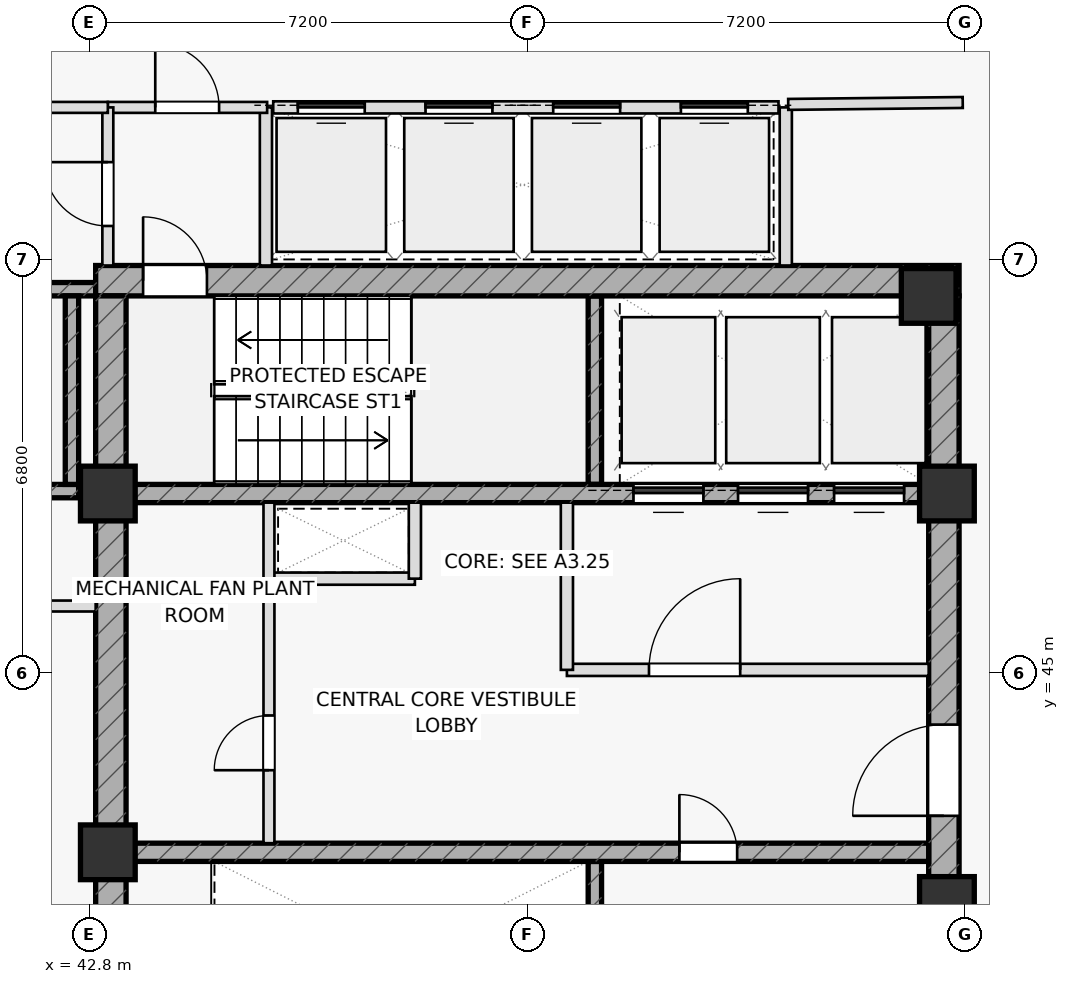
"""IFC4 building model, lengths in metres.
Left out: names, types, materials, properties, quantities, classifications, styles, units other than length and angle.
Written with IfcOpenShell. Run it as: python <this file> out.ifc"""

import sys

from ifc_helpers import new_model, si_unit, direction, frame, frame_2d, origin, origin_2d, place, context, subcontext, project, spatial, rectangle, extrude, element, fill, save


model = new_model("IFC4")
c1 = context("Model", 3, precision=1e-05, world=origin(), true_north=direction((0.0, 1.0)))
c2 = subcontext(c1, "Body", "Model", "MODEL_VIEW")
j1 = project(units=[si_unit("LENGTHUNIT", "METRE"), si_unit("PLANEANGLEUNIT", "RADIAN")], contexts=[c1])
p1 = place(None, origin())
s1 = spatial("IfcSite", under=j1, at=p1, CompositionType="ELEMENT")
p2 = place(p1, origin())
s2 = spatial("IfcBuilding", under=s1, at=p2, CompositionType="ELEMENT")
p3 = place(p2, frame((0.0, 0.0, 325.5)))
s3 = spatial("IfcBuildingStorey", under=s2, at=p3, CompositionType="ELEMENT", Elevation=325.5)
for number, where, z_axis, x_axis in (
    (1, (51.11, 48.1, 0.0), (0.0, 0.0, 1.0), (0.0, 1.0, 0.0)),
    (2, (51.11, 38.8, 0.0), (0.0, 0.0, 1.0), (0.0, 1.0, 0.0)),
):
    element("IfcWall", number, at=place(p3, frame(where, z_axis=z_axis, x_axis=x_axis)), inside=s3, PredefinedType="SHEAR", context=c2, shape_type="SweptSolid", body=[
        extrude(rectangle(XDim=3.1, YDim=0.22, at=frame_2d((1.55, 0.0))), origin(), (0.0, 0.0, 1.0), 6.25),
    ])
p4 = place(p3, frame((34.93, 47.99, 0.0), z_axis=(0.0, 0.0, 1.0), x_axis=(1.0, 0.0, 0.0)))
e3 = element("IfcWall", 3, at=p4, inside=s3, PredefinedType="SHEAR", context=c2, shape_type="SweptSolid", body=[
    extrude(rectangle(XDim=7.69, YDim=0.22, at=frame_2d((3.845, 0.0))), origin(), (0.0, 0.0, 1.0), 6.25),
])
p5 = place(p4, frame((0.55, 0.0, 0.0)))
e4 = element("IfcOpeningElement", 4, at=p5, cuts=e3, PredefinedType="OPENING", context=c2, shape_type="SweptSolid", body=[
    extrude(rectangle(XDim=1.05, YDim=2.2, at=frame_2d((0.525, 1.1))), frame((0.0, 0.12, 0.0), z_axis=(0.0, -1.0, 0.0), x_axis=(1.0, 0.0, 0.0)), (0.0, 0.0, 1.0), 0.24),
])
p6 = place(p3, frame((34.93, 51.31, 0.0), z_axis=(0.0, 0.0, 1.0), x_axis=(1.0, 0.0, 0.0)))
e5 = element("IfcWall", 5, at=p6, inside=s3, PredefinedType="SHEAR", context=c2, shape_type="SweptSolid", body=[
    extrude(rectangle(XDim=8.12, YDim=0.22, at=frame_2d((4.06, 0.0))), origin(), (0.0, 0.0, 1.0), 6.25),
])
p7 = place(p3, frame((42.51, 48.1, 0.0), z_axis=(0.0, 0.0, 1.0), x_axis=(0.0, 1.0, 0.0)))
e6 = element("IfcWall", 6, at=p7, inside=s3, PredefinedType="SHEAR", context=c2, shape_type="SweptSolid", body=[
    extrude(rectangle(XDim=3.1, YDim=0.22, at=frame_2d((1.55, 0.0))), origin(), (0.0, 0.0, 1.0), 6.25),
])
p8 = place(p3, frame((42.9, 51.45, 0.0), z_axis=(0.0, 0.0, 1.0), x_axis=(1.0, 0.0, 0.0)))
e7 = element("IfcWall", 7, at=p8, inside=s3, PredefinedType="SHEAR", context=c2, shape_type="SweptSolid", body=[
    extrude(rectangle(XDim=14.2, YDim=0.5, at=frame_2d((7.1, 0.0))), origin(), (0.0, 0.0, 1.0), 6.25),
])
p9 = place(p8, frame((0.78, 0.0, 0.0)))
e8 = element("IfcOpeningElement", 8, at=p9, cuts=e7, PredefinedType="OPENING", context=c2, shape_type="SweptSolid", body=[
    extrude(rectangle(XDim=1.05, YDim=2.2, at=frame_2d((0.525, 1.1))), frame((0.0, 0.26, 0.0), z_axis=(0.0, -1.0, 0.0), x_axis=(1.0, 0.0, 0.0)), (0.0, 0.0, 1.0), 0.52),
])
p10 = place(p3, frame((43.15, 38.8, 0.0), z_axis=(0.0, 0.0, 1.0), x_axis=(0.0, 1.0, 0.0)))
e9 = element("IfcWall", 9, at=p10, inside=s3, PredefinedType="SHEAR", context=c2, shape_type="SweptSolid", body=[
    extrude(rectangle(XDim=12.4, YDim=0.5, at=frame_2d((6.2, 0.0))), origin(), (0.0, 0.0, 1.0), 6.25),
])
p11 = place(p3, frame((56.85, 38.8, 0.0), z_axis=(0.0, 0.0, 1.0), x_axis=(0.0, 1.0, 0.0)))
e10 = element("IfcWall", 10, at=p11, inside=s3, PredefinedType="SHEAR", context=c2, shape_type="SweptSolid", body=[
    extrude(rectangle(XDim=12.4, YDim=0.5, at=frame_2d((6.2, 0.0))), origin(), (0.0, 0.0, 1.0), 6.25),
])
p12 = place(p11, frame((3.85, 0.0, 0.0)))
e11 = element("IfcOpeningElement", 11, at=p12, cuts=e10, PredefinedType="OPENING", context=c2, shape_type="SweptSolid", body=[
    extrude(rectangle(XDim=1.5, YDim=2.2, at=frame_2d((0.75, 1.1))), frame((0.0, 0.26, 0.0), z_axis=(0.0, -1.0, 0.0), x_axis=(1.0, 0.0, 0.0)), (0.0, 0.0, 1.0), 0.52),
])
p13 = place(p3, frame((43.4, 47.95, 0.0), z_axis=(0.0, 0.0, 1.0), x_axis=(1.0, 0.0, 0.0)))
e12 = element("IfcWall", 12, at=p13, inside=s3, PredefinedType="SHEAR", context=c2, shape_type="SweptSolid", body=[
    extrude(rectangle(XDim=13.2, YDim=0.3, at=frame_2d((6.6, 0.0))), origin(), (0.0, 0.0, 1.0), 6.25),
])
p14 = place(p13, frame((8.345, 0.0, 0.0)))
e13 = element("IfcOpeningElement", 13, at=p14, cuts=e12, PredefinedType="OPENING", context=c2, shape_type="SweptSolid", body=[
    extrude(rectangle(XDim=1.15, YDim=2.2, at=frame_2d((0.575, 1.1))), frame((0.0, 0.16, 0.0), z_axis=(0.0, -1.0, 0.0), x_axis=(1.0, 0.0, 0.0)), (0.0, 0.0, 1.0), 0.32),
])
p15 = place(p13, frame((10.065, 0.0, 0.0)))
e14 = element("IfcOpeningElement", 14, at=p15, cuts=e12, PredefinedType="OPENING", context=c2, shape_type="SweptSolid", body=[
    extrude(rectangle(XDim=1.15, YDim=2.2, at=frame_2d((0.575, 1.1))), frame((0.0, 0.16, 0.0), z_axis=(0.0, -1.0, 0.0), x_axis=(1.0, 0.0, 0.0)), (0.0, 0.0, 1.0), 0.32),
])
p16 = place(p13, frame((11.645, 0.0, 0.0)))
e15 = element("IfcOpeningElement", 15, at=p16, cuts=e12, PredefinedType="OPENING", context=c2, shape_type="SweptSolid", body=[
    extrude(rectangle(XDim=1.15, YDim=2.2, at=frame_2d((0.575, 1.1))), frame((0.0, 0.16, 0.0), z_axis=(0.0, -1.0, 0.0), x_axis=(1.0, 0.0, 0.0)), (0.0, 0.0, 1.0), 0.32),
])
p17 = place(p3, frame((43.4, 42.05, 0.0), z_axis=(0.0, 0.0, 1.0), x_axis=(1.0, 0.0, 0.0)))
e16 = element("IfcWall", 16, at=p17, inside=s3, PredefinedType="SHEAR", context=c2, shape_type="SweptSolid", body=[
    extrude(rectangle(XDim=13.2, YDim=0.3, at=frame_2d((6.6, 0.0))), origin(), (0.0, 0.0, 1.0), 6.25),
])
p18 = place(p17, frame((9.1, 0.0, 0.0)))
e17 = element("IfcOpeningElement", 17, at=p18, cuts=e16, PredefinedType="OPENING", context=c2, shape_type="SweptSolid", body=[
    extrude(rectangle(XDim=0.95, YDim=2.05, at=frame_2d((0.475, 1.025))), frame((0.0, 0.16, 0.0), z_axis=(0.0, -1.0, 0.0), x_axis=(1.0, 0.0, 0.0)), (0.0, 0.0, 1.0), 0.32),
])
for number, where, z_axis, x_axis in (
    (18, (43.1, 47.95, 0.0), (0.0, 0.0, 1.0), (1.0, 0.0, 0.0)),
    (19, (56.9, 47.95, 0.0), (0.0, 0.0, 1.0), (1.0, 0.0, 0.0)),
    (20, (56.6, 51.2, 0.0), (0.0, 0.0, 1.0), (1.0, 0.0, 0.0)),
    (21, (43.1, 42.05, 0.0), (0.0, 0.0, 1.0), (1.0, 0.0, 0.0)),
    (22, (56.9, 41.2, 0.0), (0.0, 0.0, 1.0), (1.0, 0.0, 0.0)),
):
    element("IfcColumn", number, at=place(p3, frame(where, z_axis=z_axis, x_axis=x_axis)), inside=s3, PredefinedType="COLUMN", context=c2, shape_type="SweptSolid", body=[
        extrude(rectangle(XDim=0.9, YDim=0.9, at=origin_2d()), origin(), (0.0, 0.0, 1.0), 6.25),
    ])
for number, where, z_axis, x_axis in (
    (23, (45.7, 51.7, 0.0), (0.0, 0.0, 1.0), (0.0, 1.0, 0.0)),
    (24, (54.25, 51.7, 0.0), (0.0, 0.0, 1.0), (0.0, 1.0, 0.0)),
):
    element("IfcWall", number, at=place(p3, frame(where, z_axis=z_axis, x_axis=x_axis)), inside=s3, PredefinedType="PARTITIONING", context=c2, shape_type="SweptSolid", body=[
        extrude(rectangle(XDim=2.6, YDim=0.2, at=frame_2d((1.3, 0.0))), origin(), (0.0, 0.0, 1.0), 6.25),
    ])
p19 = place(p3, frame((45.75, 46.55, 0.0), z_axis=(0.0, 0.0, 1.0), x_axis=(1.0, 0.0, 0.0)))
e25 = element("IfcWall", 25, at=p19, inside=s3, PredefinedType="PARTITIONING", context=c2, shape_type="SweptSolid", body=[
    extrude(rectangle(XDim=2.4, YDim=0.2, at=frame_2d((1.2, 0.0))), origin(), (0.0, 0.0, 1.0), 6.25),
])
p20 = place(p3, frame((48.15, 46.55, 0.0), z_axis=(0.0, 0.0, 1.0), x_axis=(0.0, 1.0, 0.0)))
e26 = element("IfcWall", 26, at=p20, inside=s3, PredefinedType="PARTITIONING", context=c2, shape_type="SweptSolid", body=[
    extrude(rectangle(XDim=1.25, YDim=0.2, at=frame_2d((0.625, 0.0))), origin(), (0.0, 0.0, 1.0), 6.25),
])
p21 = place(p3, frame((50.65, 45.05, 0.0), z_axis=(0.0, 0.0, 1.0), x_axis=(1.0, 0.0, 0.0)))
e27 = element("IfcWall", 27, at=p21, inside=s3, PredefinedType="PARTITIONING", context=c2, shape_type="SweptSolid", body=[
    extrude(rectangle(XDim=5.95, YDim=0.2, at=frame_2d((2.975, 0.0))), origin(), (0.0, 0.0, 1.0), 6.25),
])
p22 = place(p21, frame((1.35, 0.0, 0.0)))
e28 = element("IfcOpeningElement", 28, at=p22, cuts=e27, PredefinedType="OPENING", context=c2, shape_type="SweptSolid", body=[
    extrude(rectangle(XDim=1.5, YDim=2.2, at=frame_2d((0.75, 1.1))), frame((0.0, 0.11, 0.0), z_axis=(0.0, -1.0, 0.0), x_axis=(1.0, 0.0, 0.0)), (0.0, 0.0, 1.0), 0.22),
])
p23 = place(p3, frame((50.65, 45.05, 0.0), z_axis=(0.0, 0.0, 1.0), x_axis=(0.0, 1.0, 0.0)))
e29 = element("IfcWall", 29, at=p23, inside=s3, PredefinedType="PARTITIONING", context=c2, shape_type="SweptSolid", body=[
    extrude(rectangle(XDim=2.75, YDim=0.2, at=frame_2d((1.375, 0.0))), origin(), (0.0, 0.0, 1.0), 6.25),
])
p24 = place(p3, frame((45.75, 42.2, 0.0), z_axis=(0.0, 0.0, 1.0), x_axis=(0.0, 1.0, 0.0)))
e30 = element("IfcWall", 30, at=p24, inside=s3, PredefinedType="PARTITIONING", context=c2, shape_type="SweptSolid", body=[
    extrude(rectangle(XDim=5.6, YDim=0.18, at=frame_2d((2.8, 0.0))), origin(), (0.0, 0.0, 1.0), 6.25),
])
p25 = place(p24, frame((1.2, 0.0, 0.0)))
e31 = element("IfcOpeningElement", 31, at=p25, cuts=e30, PredefinedType="OPENING", context=c2, shape_type="SweptSolid", body=[
    extrude(rectangle(XDim=0.9, YDim=2.05, at=frame_2d((0.45, 1.025))), frame((0.0, 0.1, 0.0), z_axis=(0.0, -1.0, 0.0), x_axis=(1.0, 0.0, 0.0)), (0.0, 0.0, 1.0), 0.2),
])
p26 = place(p3, frame((43.1, 54.3, 0.0), z_axis=(0.0, 0.0, 1.0), x_axis=(1.0, 0.0, 0.0)))
e32 = element("IfcWall", 32, at=p26, inside=s3, PredefinedType="PARTITIONING", context=c2, shape_type="SweptSolid", body=[
    extrude(rectangle(XDim=2.62, YDim=0.18, at=frame_2d((1.31, 0.0))), origin(), (0.0, 0.0, 1.0), 4.625),
])
p27 = place(p26, frame((0.78, 0.0, 0.0)))
e33 = element("IfcOpeningElement", 33, at=p27, cuts=e32, PredefinedType="OPENING", context=c2, shape_type="SweptSolid", body=[
    extrude(rectangle(XDim=1.05, YDim=2.2, at=frame_2d((0.525, 1.1))), frame((0.0, 0.1, 0.0), z_axis=(0.0, -1.0, 0.0), x_axis=(1.0, 0.0, 0.0)), (0.0, 0.0, 1.0), 0.2),
])
p28 = place(p3, frame((43.1, 51.7, 0.0), z_axis=(0.0, 0.0, 1.0), x_axis=(0.0, 1.0, 0.0)))
e34 = element("IfcWall", 34, at=p28, inside=s3, PredefinedType="PARTITIONING", context=c2, shape_type="SweptSolid", body=[
    extrude(rectangle(XDim=2.6, YDim=0.18, at=frame_2d((1.3, 0.0))), origin(), (0.0, 0.0, 1.0), 4.625),
])
p29 = place(p28, frame((0.65, 0.0, 0.0)))
e35 = element("IfcOpeningElement", 35, at=p29, cuts=e34, PredefinedType="OPENING", context=c2, shape_type="SweptSolid", body=[
    extrude(rectangle(XDim=1.05, YDim=2.2, at=frame_2d((0.525, 1.1))), frame((0.0, 0.1, 0.0), z_axis=(0.0, -1.0, 0.0), x_axis=(1.0, 0.0, 0.0)), (0.0, 0.0, 1.0), 0.2),
])
p30 = place(p3, frame((34.629, 54.3, 0.0), z_axis=(0.0, 0.0, 1.0), x_axis=(1.0, 0.0, 0.0)))
e36 = element("IfcWall", 36, at=p30, inside=s3, PredefinedType="PARTITIONING", context=c2, shape_type="SweptSolid", body=[
    extrude(rectangle(XDim=8.471, YDim=0.18, at=frame_2d((4.236, 0.0))), origin(), (0.0, 0.0, 1.0), 3.725),
])
p31 = place(p3, frame((34.85, 46.1, 0.0), z_axis=(0.0, 0.0, 1.0), x_axis=(1.0, 0.0, 0.0)))
e37 = element("IfcWall", 37, at=p31, inside=s3, PredefinedType="PARTITIONING", context=c2, shape_type="SweptSolid", body=[
    extrude(rectangle(XDim=8.05, YDim=0.18, at=frame_2d((4.025, 0.0))), origin(), (0.0, 0.0, 1.0), 3.725),
])
p32 = place(p3, frame((54.29, 54.349, 0.0), z_axis=(0.0, 0.0, 1.0), x_axis=(0.999940720292, 0.010888337916, 0.0)))
e38 = element("IfcWall", 38, at=p32, inside=s3, PredefinedType="PARTITIONING", context=c2, shape_type="SweptSolid", body=[
    extrude(rectangle(XDim=2.87, YDim=0.18, at=frame_2d((1.435, 0.0))), origin(), (0.0, 0.0, 1.0), 4.625),
])
p33 = place(p3, frame((45.82, 54.3, 0.0), z_axis=(0.0, 0.0, 1.0), x_axis=(1.0, 0.0, 0.0)))
e39 = element("IfcWall", 39, at=p33, inside=s3, PredefinedType="PARTITIONING", context=c2, shape_type="SweptSolid", body=[
    extrude(rectangle(XDim=8.31, YDim=0.2, at=frame_2d((4.155, 0.0))), origin(), (0.0, 0.0, 1.0), 6.25),
])
p34 = place(p33, frame((0.405, 0.0, 0.0)))
e40 = element("IfcOpeningElement", 40, at=p34, cuts=e39, PredefinedType="OPENING", context=c2, shape_type="SweptSolid", body=[
    extrude(rectangle(XDim=1.1, YDim=2.15, at=frame_2d((0.55, 1.075))), frame((0.0, 0.11, 0.0), z_axis=(0.0, -1.0, 0.0), x_axis=(1.0, 0.0, 0.0)), (0.0, 0.0, 1.0), 0.22),
])
p35 = place(p33, frame((2.505, 0.0, 0.0)))
e41 = element("IfcOpeningElement", 41, at=p35, cuts=e39, PredefinedType="OPENING", context=c2, shape_type="SweptSolid", body=[
    extrude(rectangle(XDim=1.1, YDim=2.15, at=frame_2d((0.55, 1.075))), frame((0.0, 0.11, 0.0), z_axis=(0.0, -1.0, 0.0), x_axis=(1.0, 0.0, 0.0)), (0.0, 0.0, 1.0), 0.22),
])
p36 = place(p33, frame((4.605, 0.0, 0.0)))
e42 = element("IfcOpeningElement", 42, at=p36, cuts=e39, PredefinedType="OPENING", context=c2, shape_type="SweptSolid", body=[
    extrude(rectangle(XDim=1.1, YDim=2.15, at=frame_2d((0.55, 1.075))), frame((0.0, 0.11, 0.0), z_axis=(0.0, -1.0, 0.0), x_axis=(1.0, 0.0, 0.0)), (0.0, 0.0, 1.0), 0.22),
])
p37 = place(p33, frame((6.705, 0.0, 0.0)))
e43 = element("IfcOpeningElement", 43, at=p37, cuts=e39, PredefinedType="OPENING", context=c2, shape_type="SweptSolid", body=[
    extrude(rectangle(XDim=1.1, YDim=2.15, at=frame_2d((0.55, 1.075))), frame((0.0, 0.11, 0.0), z_axis=(0.0, -1.0, 0.0), x_axis=(1.0, 0.0, 0.0)), (0.0, 0.0, 1.0), 0.22),
])
p38 = place(p9, origin())
e44 = element("IfcDoor", 44, at=p38, inside=s3, OperationType="SINGLE_SWING_LEFT", PredefinedType="DOOR", context=c2, shape_type="SweptSolid", body=[
    extrude(rectangle(XDim=1.05, YDim=2.2, at=frame_2d((0.525, 1.1))), frame((0.0, 0.025, 0.0), z_axis=(0.0, -1.0, 0.0), x_axis=(1.0, 0.0, 0.0)), (0.0, 0.0, 1.0), 0.05),
])
fill(e8, e44)
p39 = place(p12, origin())
e45 = element("IfcDoor", 45, at=p39, inside=s3, OperationType="SINGLE_SWING_LEFT", PredefinedType="DOOR", context=c2, shape_type="SweptSolid", body=[
    extrude(rectangle(XDim=1.5, YDim=2.2, at=frame_2d((0.75, 1.1))), frame((0.0, 0.025, 0.0), z_axis=(0.0, -1.0, 0.0), x_axis=(1.0, 0.0, 0.0)), (0.0, 0.0, 1.0), 0.05),
])
fill(e11, e45)
p40 = place(p22, origin())
e46 = element("IfcDoor", 46, at=p40, inside=s3, OperationType="SINGLE_SWING_RIGHT", PredefinedType="DOOR", context=c2, shape_type="SweptSolid", body=[
    extrude(rectangle(XDim=1.5, YDim=2.2, at=frame_2d((0.75, 1.1))), frame((0.0, 0.025, 0.0), z_axis=(0.0, -1.0, 0.0), x_axis=(1.0, 0.0, 0.0)), (0.0, 0.0, 1.0), 0.05),
])
fill(e28, e46)
p41 = place(p18, origin())
e47 = element("IfcDoor", 47, at=p41, inside=s3, OperationType="SINGLE_SWING_LEFT", PredefinedType="DOOR", context=c2, shape_type="SweptSolid", body=[
    extrude(rectangle(XDim=0.95, YDim=2.05, at=frame_2d((0.475, 1.025))), frame((0.0, 0.025, 0.0), z_axis=(0.0, -1.0, 0.0), x_axis=(1.0, 0.0, 0.0)), (0.0, 0.0, 1.0), 0.05),
])
fill(e17, e47)
p42 = place(p25, origin())
e48 = element("IfcDoor", 48, at=p42, inside=s3, OperationType="SINGLE_SWING_LEFT", PredefinedType="DOOR", context=c2, shape_type="SweptSolid", body=[
    extrude(rectangle(XDim=0.9, YDim=2.05, at=frame_2d((0.45, 1.025))), frame((0.0, 0.025, 0.0), z_axis=(0.0, -1.0, 0.0), x_axis=(1.0, 0.0, 0.0)), (0.0, 0.0, 1.0), 0.05),
])
fill(e31, e48)
p43 = place(p27, origin())
e49 = element("IfcDoor", 49, at=p43, inside=s3, OperationType="SINGLE_SWING_LEFT", PredefinedType="DOOR", context=c2, shape_type="SweptSolid", body=[
    extrude(rectangle(XDim=1.05, YDim=2.2, at=frame_2d((0.525, 1.1))), frame((0.0, 0.025, 0.0), z_axis=(0.0, -1.0, 0.0), x_axis=(1.0, 0.0, 0.0)), (0.0, 0.0, 1.0), 0.05),
])
fill(e33, e49)
p44 = place(p29, origin())
e50 = element("IfcDoor", 50, at=p44, inside=s3, OperationType="SINGLE_SWING_RIGHT", PredefinedType="DOOR", context=c2, shape_type="SweptSolid", body=[
    extrude(rectangle(XDim=1.05, YDim=2.2, at=frame_2d((0.525, 1.1))), frame((0.0, 0.025, 0.0), z_axis=(0.0, -1.0, 0.0), x_axis=(1.0, 0.0, 0.0)), (0.0, 0.0, 1.0), 0.05),
])
fill(e35, e50)
p45 = place(p14, origin())
e51 = element("IfcDoor", 51, at=p45, inside=s3, OperationType="SLIDING_TO_LEFT", PredefinedType="DOOR", context=c2, shape_type="SweptSolid", body=[
    extrude(rectangle(XDim=1.15, YDim=2.2, at=frame_2d((0.575, 1.1))), frame((0.0, 0.025, 0.0), z_axis=(0.0, -1.0, 0.0), x_axis=(1.0, 0.0, 0.0)), (0.0, 0.0, 1.0), 0.05),
])
fill(e13, e51)
p46 = place(p15, origin())
e52 = element("IfcDoor", 52, at=p46, inside=s3, OperationType="SLIDING_TO_LEFT", PredefinedType="DOOR", context=c2, shape_type="SweptSolid", body=[
    extrude(rectangle(XDim=1.15, YDim=2.2, at=frame_2d((0.575, 1.1))), frame((0.0, 0.025, 0.0), z_axis=(0.0, -1.0, 0.0), x_axis=(1.0, 0.0, 0.0)), (0.0, 0.0, 1.0), 0.05),
])
fill(e14, e52)
p47 = place(p16, origin())
e53 = element("IfcDoor", 53, at=p47, inside=s3, OperationType="SLIDING_TO_LEFT", PredefinedType="DOOR", context=c2, shape_type="SweptSolid", body=[
    extrude(rectangle(XDim=1.15, YDim=2.2, at=frame_2d((0.575, 1.1))), frame((0.0, 0.025, 0.0), z_axis=(0.0, -1.0, 0.0), x_axis=(1.0, 0.0, 0.0)), (0.0, 0.0, 1.0), 0.05),
])
fill(e15, e53)
p48 = place(p34, origin())
e54 = element("IfcDoor", 54, at=p48, inside=s3, OperationType="SLIDING_TO_LEFT", PredefinedType="DOOR", context=c2, shape_type="SweptSolid", body=[
    extrude(rectangle(XDim=1.1, YDim=2.15, at=frame_2d((0.55, 1.075))), frame((0.0, 0.025, 0.0), z_axis=(0.0, -1.0, 0.0), x_axis=(1.0, 0.0, 0.0)), (0.0, 0.0, 1.0), 0.05),
])
fill(e40, e54)
p49 = place(p35, origin())
e55 = element("IfcDoor", 55, at=p49, inside=s3, OperationType="SLIDING_TO_RIGHT", PredefinedType="DOOR", context=c2, shape_type="SweptSolid", body=[
    extrude(rectangle(XDim=1.1, YDim=2.15, at=frame_2d((0.55, 1.075))), frame((0.0, 0.025, 0.0), z_axis=(0.0, -1.0, 0.0), x_axis=(1.0, 0.0, 0.0)), (0.0, 0.0, 1.0), 0.05),
])
fill(e41, e55)
p50 = place(p36, origin())
e56 = element("IfcDoor", 56, at=p50, inside=s3, OperationType="SLIDING_TO_LEFT", PredefinedType="DOOR", context=c2, shape_type="SweptSolid", body=[
    extrude(rectangle(XDim=1.1, YDim=2.15, at=frame_2d((0.55, 1.075))), frame((0.0, 0.025, 0.0), z_axis=(0.0, -1.0, 0.0), x_axis=(1.0, 0.0, 0.0)), (0.0, 0.0, 1.0), 0.05),
])
fill(e42, e56)
p51 = place(p37, origin())
e57 = element("IfcDoor", 57, at=p51, inside=s3, OperationType="SLIDING_TO_RIGHT", PredefinedType="DOOR", context=c2, shape_type="SweptSolid", body=[
    extrude(rectangle(XDim=1.1, YDim=2.15, at=frame_2d((0.55, 1.075))), frame((0.0, 0.025, 0.0), z_axis=(0.0, -1.0, 0.0), x_axis=(1.0, 0.0, 0.0)), (0.0, 0.0, 1.0), 0.05),
])
fill(e43, e57)
save(model, sys.argv[1])
